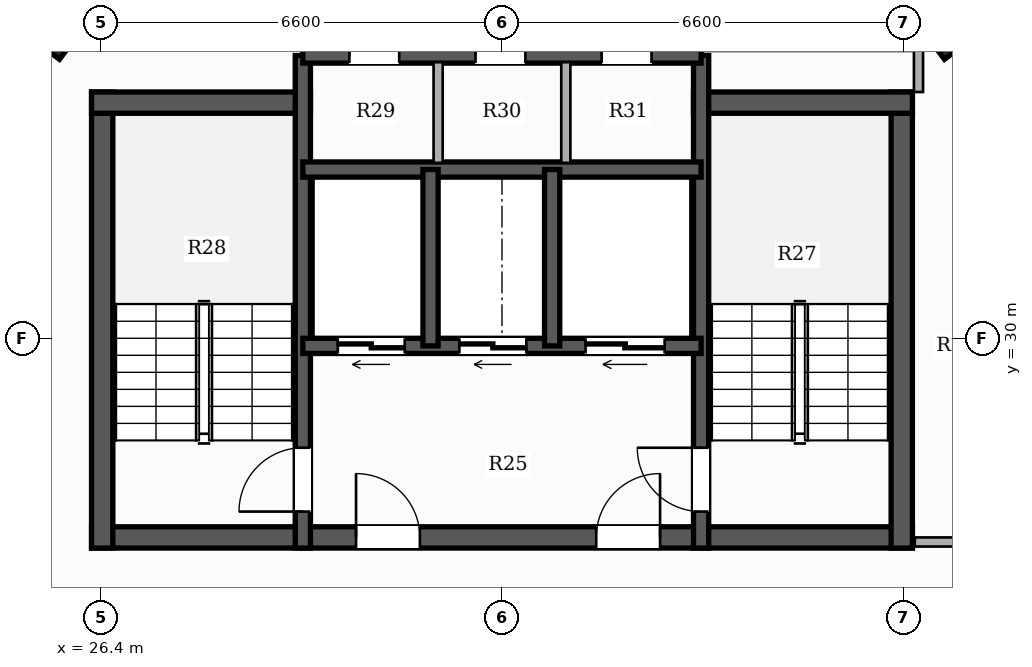
"""IFC4 building model, lengths in metres.
Left out: names, types, materials, properties, quantities, classifications, styles, units other than length and angle.
Written with IfcOpenShell. Run it as: python <this file> out.ifc"""

import sys

from ifc_helpers import new_model, si_unit, direction, frame, frame_2d, origin, origin_2d, place, context, subcontext, project, spatial, rectangle, hollow_rectangle, extrude, element, fill, save


model = new_model("IFC4")
c1 = context("Model", 3, precision=1e-05, world=origin(), true_north=direction((0.0, 1.0)))
c2 = subcontext(c1, "Body", "Model", "MODEL_VIEW")
j1 = project(units=[si_unit("LENGTHUNIT", "METRE"), si_unit("PLANEANGLEUNIT", "RADIAN")], contexts=[c1])
p1 = place(None, origin())
s1 = spatial("IfcSite", under=j1, at=p1, CompositionType="ELEMENT")
p2 = place(p1, origin())
s2 = spatial("IfcBuilding", under=s1, at=p2, CompositionType="ELEMENT")
p3 = place(p2, frame((0.0, 0.0, 212.9)))
s3 = spatial("IfcBuildingStorey", under=s2, at=p3, CompositionType="ELEMENT", Elevation=212.9)
p4 = place(p3, frame((26.25, 26.725, 0.0), z_axis=(0.0, 0.0, 1.0), x_axis=(1.0, 0.0, 0.0)))
e1 = element("IfcWall", 1, at=p4, inside=s3, PredefinedType="SHEAR", context=c2, shape_type="SweptSolid", body=[
    extrude(rectangle(XDim=13.5, YDim=0.35, at=frame_2d((6.75, 0.0))), origin(), (0.0, 0.0, 1.0), 3.3),
])
p5 = place(p4, frame((4.35, 0.0, 0.0)))
e2 = element("IfcOpeningElement", 2, at=p5, cuts=e1, PredefinedType="OPENING", context=c2, shape_type="SweptSolid", body=[
    extrude(rectangle(XDim=1.05, YDim=2.15, at=frame_2d((0.525, 1.075))), frame((0.0, 0.185, 0.0), z_axis=(0.0, -1.0, 0.0), x_axis=(1.0, 0.0, 0.0)), (0.0, 0.0, 1.0), 0.37),
])
p6 = place(p4, frame((8.3, 0.0, 0.0)))
e3 = element("IfcOpeningElement", 3, at=p6, cuts=e1, PredefinedType="OPENING", context=c2, shape_type="SweptSolid", body=[
    extrude(rectangle(XDim=1.05, YDim=2.15, at=frame_2d((0.525, 1.075))), frame((0.0, 0.185, 0.0), z_axis=(0.0, -1.0, 0.0), x_axis=(1.0, 0.0, 0.0)), (0.0, 0.0, 1.0), 0.37),
])
p7 = place(p3, frame((26.425, 26.55, 0.0), z_axis=(0.0, 0.0, 1.0), x_axis=(0.0, 1.0, 0.0)))
e4 = element("IfcWall", 4, at=p7, inside=s3, PredefinedType="SHEAR", context=c2, shape_type="SweptSolid", body=[
    extrude(rectangle(XDim=7.5, YDim=0.35, at=frame_2d((3.75, 0.0))), origin(), (0.0, 0.0, 1.0), 3.3),
])
p8 = place(p3, frame((26.25, 33.875, 0.0), z_axis=(0.0, 0.0, 1.0), x_axis=(1.0, 0.0, 0.0)))
e5 = element("IfcWall", 5, at=p8, inside=s3, PredefinedType="SHEAR", context=c2, shape_type="SweptSolid", body=[
    extrude(rectangle(XDim=3.6, YDim=0.35, at=frame_2d((1.8, 0.0))), origin(), (0.0, 0.0, 1.0), 3.3),
])
p9 = place(p3, frame((39.575, 26.55, 0.0), z_axis=(0.0, 0.0, 1.0), x_axis=(0.0, 1.0, 0.0)))
e6 = element("IfcWall", 6, at=p9, inside=s3, PredefinedType="SHEAR", context=c2, shape_type="SweptSolid", body=[
    extrude(rectangle(XDim=7.5, YDim=0.35, at=frame_2d((3.75, 0.0))), origin(), (0.0, 0.0, 1.0), 3.3),
])
p10 = place(p3, frame((36.15, 33.875, 0.0), z_axis=(0.0, 0.0, 1.0), x_axis=(1.0, 0.0, 0.0)))
e7 = element("IfcWall", 7, at=p10, inside=s3, PredefinedType="SHEAR", context=c2, shape_type="SweptSolid", body=[
    extrude(rectangle(XDim=3.6, YDim=0.35, at=frame_2d((1.8, 0.0))), origin(), (0.0, 0.0, 1.0), 3.3),
])
p11 = place(p3, frame((29.725, 26.55, 0.0), z_axis=(0.0, 0.0, 1.0), x_axis=(0.0, 1.0, 0.0)))
e8 = element("IfcWall", 8, at=p11, inside=s3, PredefinedType="SHEAR", context=c2, shape_type="SweptSolid", body=[
    extrude(rectangle(XDim=8.1, YDim=0.25, at=frame_2d((4.05, 0.0))), origin(), (0.0, 0.0, 1.0), 3.3),
])
p12 = place(p11, frame((0.6, 0.0, 0.0)))
e9 = element("IfcOpeningElement", 9, at=p12, cuts=e8, PredefinedType="OPENING", context=c2, shape_type="SweptSolid", body=[
    extrude(rectangle(XDim=1.05, YDim=2.15, at=frame_2d((0.525, 1.075))), frame((0.0, 0.135, 0.0), z_axis=(0.0, -1.0, 0.0), x_axis=(1.0, 0.0, 0.0)), (0.0, 0.0, 1.0), 0.27),
])
p13 = place(p3, frame((36.275, 26.55, 0.0), z_axis=(0.0, 0.0, 1.0), x_axis=(0.0, 1.0, 0.0)))
e10 = element("IfcWall", 10, at=p13, inside=s3, PredefinedType="SHEAR", context=c2, shape_type="SweptSolid", body=[
    extrude(rectangle(XDim=8.1, YDim=0.25, at=frame_2d((4.05, 0.0))), origin(), (0.0, 0.0, 1.0), 3.3),
])
p14 = place(p13, frame((0.6, 0.0, 0.0)))
e11 = element("IfcOpeningElement", 11, at=p14, cuts=e10, PredefinedType="OPENING", context=c2, shape_type="SweptSolid", body=[
    extrude(rectangle(XDim=1.05, YDim=2.15, at=frame_2d((0.525, 1.075))), frame((0.0, 0.135, 0.0), z_axis=(0.0, -1.0, 0.0), x_axis=(1.0, 0.0, 0.0)), (0.0, 0.0, 1.0), 0.27),
])
p15 = place(p3, frame((36.275, 29.875, 0.0), z_axis=(0.0, 0.0, 1.0), x_axis=(-1.0, 0.0, 0.0)))
e12 = element("IfcWall", 12, at=p15, inside=s3, PredefinedType="SHEAR", context=c2, shape_type="SweptSolid", body=[
    extrude(rectangle(XDim=6.55, YDim=0.25, at=frame_2d((3.275, 0.0))), origin(), (0.0, 0.0, 1.0), 3.3),
])
p16 = place(p15, frame((4.875, 0.0, 0.0)))
e13 = element("IfcOpeningElement", 13, at=p16, cuts=e12, PredefinedType="OPENING", context=c2, shape_type="SweptSolid", body=[
    extrude(rectangle(XDim=1.1, YDim=2.2, at=frame_2d((0.55, 1.1))), frame((0.0, 0.135, 0.0), z_axis=(0.0, -1.0, 0.0), x_axis=(1.0, 0.0, 0.0)), (0.0, 0.0, 1.0), 0.27),
])
p17 = place(p15, frame((2.875, 0.0, 0.0)))
e14 = element("IfcOpeningElement", 14, at=p17, cuts=e12, PredefinedType="OPENING", context=c2, shape_type="SweptSolid", body=[
    extrude(rectangle(XDim=1.1, YDim=2.2, at=frame_2d((0.55, 1.1))), frame((0.0, 0.135, 0.0), z_axis=(0.0, -1.0, 0.0), x_axis=(1.0, 0.0, 0.0)), (0.0, 0.0, 1.0), 0.27),
])
p18 = place(p15, frame((0.6, 0.0, 0.0)))
e15 = element("IfcOpeningElement", 15, at=p18, cuts=e12, PredefinedType="OPENING", context=c2, shape_type="SweptSolid", body=[
    extrude(rectangle(XDim=1.3, YDim=2.2, at=frame_2d((0.65, 1.1))), frame((0.0, 0.135, 0.0), z_axis=(0.0, -1.0, 0.0), x_axis=(1.0, 0.0, 0.0)), (0.0, 0.0, 1.0), 0.27),
])
p19 = place(p3, frame((29.725, 32.775, 0.0), z_axis=(0.0, 0.0, 1.0), x_axis=(1.0, 0.0, 0.0)))
e16 = element("IfcWall", 16, at=p19, inside=s3, PredefinedType="SHEAR", context=c2, shape_type="SweptSolid", body=[
    extrude(rectangle(XDim=6.55, YDim=0.25, at=frame_2d((3.275, 0.0))), origin(), (0.0, 0.0, 1.0), 3.3),
])
for number, where, z_axis, x_axis in (
    (17, (31.825, 29.875, 0.0), (0.0, 0.0, 1.0), (0.0, 1.0, 0.0)),
    (18, (33.825, 29.875, 0.0), (0.0, 0.0, 1.0), (0.0, 1.0, 0.0)),
):
    element("IfcWall", number, at=place(p3, frame(where, z_axis=z_axis, x_axis=x_axis)), inside=s3, PredefinedType="SHEAR", context=c2, shape_type="SweptSolid", body=[
        extrude(rectangle(XDim=2.9, YDim=0.25, at=frame_2d((1.45, 0.0))), origin(), (0.0, 0.0, 1.0), 3.3),
    ])
p20 = place(p3, frame((29.725, 34.65, 0.0), z_axis=(0.0, 0.0, 1.0), x_axis=(1.0, 0.0, 0.0)))
e19 = element("IfcWall", 19, at=p20, inside=s3, PredefinedType="SHEAR", context=c2, shape_type="SweptSolid", body=[
    extrude(rectangle(XDim=6.55, YDim=0.25, at=frame_2d((3.275, 0.0))), origin(), (0.0, 0.0, 1.0), 3.3),
])
p21 = place(p20, frame((0.765, 0.0, 0.0)))
e20 = element("IfcOpeningElement", 20, at=p21, cuts=e19, PredefinedType="OPENING", context=c2, shape_type="SweptSolid", body=[
    extrude(rectangle(XDim=0.82, YDim=2.1, at=frame_2d((0.41, 1.05))), frame((0.0, 0.135, 0.0), z_axis=(0.0, -1.0, 0.0), x_axis=(1.0, 0.0, 0.0)), (0.0, 0.0, 1.0), 0.27),
])
p22 = place(p20, frame((2.84, 0.0, 0.0)))
e21 = element("IfcOpeningElement", 21, at=p22, cuts=e19, PredefinedType="OPENING", context=c2, shape_type="SweptSolid", body=[
    extrude(rectangle(XDim=0.82, YDim=2.1, at=frame_2d((0.41, 1.05))), frame((0.0, 0.135, 0.0), z_axis=(0.0, -1.0, 0.0), x_axis=(1.0, 0.0, 0.0)), (0.0, 0.0, 1.0), 0.27),
])
p23 = place(p20, frame((4.915, 0.0, 0.0)))
e22 = element("IfcOpeningElement", 22, at=p23, cuts=e19, PredefinedType="OPENING", context=c2, shape_type="SweptSolid", body=[
    extrude(rectangle(XDim=0.82, YDim=2.1, at=frame_2d((0.41, 1.05))), frame((0.0, 0.135, 0.0), z_axis=(0.0, -1.0, 0.0), x_axis=(1.0, 0.0, 0.0)), (0.0, 0.0, 1.0), 0.27),
])
for number, where, z_axis, x_axis in (
    (23, (25.648, 35.113, 0.0), (0.0, 0.0, 1.0), (0.6, 0.8, 0.0)),
    (24, (40.352, 35.113, 0.0), (0.0, 0.0, 1.0), (-0.6, 0.8, 0.0)),
):
    element("IfcColumn", number, at=place(p3, frame(where, z_axis=z_axis, x_axis=x_axis)), inside=s3, PredefinedType="COLUMN", context=c2, shape_type="SweptSolid", body=[
        extrude(hollow_rectangle(XDim=0.75, YDim=0.75, WallThickness=0.025, at=origin_2d()), origin(), (0.0, 0.0, 1.0), 3.3),
    ])
for number, where, z_axis, x_axis in (
    (25, (31.95, 32.885, 0.0), (0.0, 0.0, 1.0), (0.0, 1.0, 0.0)),
    (26, (34.05, 32.885, 0.0), (0.0, 0.0, 1.0), (0.0, 1.0, 0.0)),
):
    element("IfcWall", number, at=place(p3, frame(where, z_axis=z_axis, x_axis=x_axis)), inside=s3, PredefinedType="PARTITIONING", context=c2, shape_type="SweptSolid", body=[
        extrude(rectangle(XDim=1.655, YDim=0.15, at=frame_2d((0.828, 0.0))), origin(), (0.0, 0.0, 1.0), 3.06),
    ])
p24 = place(p3, frame((39.79, 26.65, 0.0), z_axis=(0.0, 0.0, 1.0), x_axis=(1.0, 0.0, 0.0)))
e27 = element("IfcWall", 27, at=p24, inside=s3, PredefinedType="PARTITIONING", context=c2, shape_type="SweptSolid", body=[
    extrude(rectangle(XDim=2.46, YDim=0.15, at=frame_2d((1.23, 0.0))), origin(), (0.0, 0.0, 1.0), 2.565),
])
p25 = place(p24, frame((0.79, 0.0, 0.0)))
e28 = element("IfcOpeningElement", 28, at=p25, cuts=e27, PredefinedType="OPENING", context=c2, shape_type="SweptSolid", body=[
    extrude(rectangle(XDim=0.88, YDim=2.1, at=frame_2d((0.44, 1.05))), frame((0.0, 0.085, 0.0), z_axis=(0.0, -1.0, 0.0), x_axis=(1.0, 0.0, 0.0)), (0.0, 0.0, 1.0), 0.17),
])
p26 = place(p3, frame((39.85, 34.74, 0.0), z_axis=(0.0, 0.0, 1.0), x_axis=(0.0, -1.0, 0.0)))
e29 = element("IfcWall", 29, at=p26, inside=s3, PredefinedType="PARTITIONING", context=c2, shape_type="SweptSolid", body=[
    extrude(rectangle(XDim=0.69, YDim=0.15, at=frame_2d((0.345, 0.0))), origin(), (0.0, 0.0, 1.0), 2.773),
])
p27 = place(p12, origin())
e30 = element("IfcDoor", 30, at=p27, inside=s3, OperationType="SINGLE_SWING_LEFT", PredefinedType="DOOR", context=c2, shape_type="SweptSolid", body=[
    extrude(rectangle(XDim=1.05, YDim=2.15, at=frame_2d((0.525, 1.075))), frame((0.0, 0.025, 0.0), z_axis=(0.0, -1.0, 0.0), x_axis=(1.0, 0.0, 0.0)), (0.0, 0.0, 1.0), 0.05),
])
fill(e9, e30)
p28 = place(p14, origin())
e31 = element("IfcDoor", 31, at=p28, inside=s3, OperationType="SINGLE_SWING_RIGHT", PredefinedType="DOOR", context=c2, shape_type="SweptSolid", body=[
    extrude(rectangle(XDim=1.05, YDim=2.15, at=frame_2d((0.525, 1.075))), frame((0.0, 0.025, 0.0), z_axis=(0.0, -1.0, 0.0), x_axis=(1.0, 0.0, 0.0)), (0.0, 0.0, 1.0), 0.05),
])
fill(e11, e31)
p29 = place(p5, origin())
e32 = element("IfcDoor", 32, at=p29, inside=s3, OperationType="SINGLE_SWING_LEFT", PredefinedType="DOOR", context=c2, shape_type="SweptSolid", body=[
    extrude(rectangle(XDim=1.05, YDim=2.15, at=frame_2d((0.525, 1.075))), frame((0.0, 0.025, 0.0), z_axis=(0.0, -1.0, 0.0), x_axis=(1.0, 0.0, 0.0)), (0.0, 0.0, 1.0), 0.05),
])
fill(e2, e32)
p30 = place(p6, origin())
e33 = element("IfcDoor", 33, at=p30, inside=s3, OperationType="SINGLE_SWING_RIGHT", PredefinedType="DOOR", context=c2, shape_type="SweptSolid", body=[
    extrude(rectangle(XDim=1.05, YDim=2.15, at=frame_2d((0.525, 1.075))), frame((0.0, 0.025, 0.0), z_axis=(0.0, -1.0, 0.0), x_axis=(1.0, 0.0, 0.0)), (0.0, 0.0, 1.0), 0.05),
])
fill(e3, e33)
p31 = place(p16, origin())
e34 = element("IfcDoor", 34, at=p31, inside=s3, OperationType="DOUBLE_DOOR_SLIDING", PredefinedType="DOOR", context=c2, shape_type="SweptSolid", body=[
    extrude(rectangle(XDim=1.1, YDim=2.2, at=frame_2d((0.55, 1.1))), frame((0.0, 0.025, 0.0), z_axis=(0.0, -1.0, 0.0), x_axis=(1.0, 0.0, 0.0)), (0.0, 0.0, 1.0), 0.05),
])
fill(e13, e34)
p32 = place(p17, origin())
e35 = element("IfcDoor", 35, at=p32, inside=s3, OperationType="DOUBLE_DOOR_SLIDING", PredefinedType="DOOR", context=c2, shape_type="SweptSolid", body=[
    extrude(rectangle(XDim=1.1, YDim=2.2, at=frame_2d((0.55, 1.1))), frame((0.0, 0.025, 0.0), z_axis=(0.0, -1.0, 0.0), x_axis=(1.0, 0.0, 0.0)), (0.0, 0.0, 1.0), 0.05),
])
fill(e14, e35)
p33 = place(p18, origin())
e36 = element("IfcDoor", 36, at=p33, inside=s3, OperationType="DOUBLE_DOOR_SLIDING", PredefinedType="DOOR", context=c2, shape_type="SweptSolid", body=[
    extrude(rectangle(XDim=1.3, YDim=2.2, at=frame_2d((0.65, 1.1))), frame((0.0, 0.025, 0.0), z_axis=(0.0, -1.0, 0.0), x_axis=(1.0, 0.0, 0.0)), (0.0, 0.0, 1.0), 0.05),
])
fill(e15, e36)
p34 = place(p21, origin())
e37 = element("IfcDoor", 37, at=p34, inside=s3, OperationType="SINGLE_SWING_LEFT", PredefinedType="DOOR", context=c2, shape_type="SweptSolid", body=[
    extrude(rectangle(XDim=0.82, YDim=2.1, at=frame_2d((0.41, 1.05))), frame((0.0, 0.025, 0.0), z_axis=(0.0, -1.0, 0.0), x_axis=(1.0, 0.0, 0.0)), (0.0, 0.0, 1.0), 0.05),
])
fill(e20, e37)
p35 = place(p22, origin())
e38 = element("IfcDoor", 38, at=p35, inside=s3, OperationType="SINGLE_SWING_LEFT", PredefinedType="DOOR", context=c2, shape_type="SweptSolid", body=[
    extrude(rectangle(XDim=0.82, YDim=2.1, at=frame_2d((0.41, 1.05))), frame((0.0, 0.025, 0.0), z_axis=(0.0, -1.0, 0.0), x_axis=(1.0, 0.0, 0.0)), (0.0, 0.0, 1.0), 0.05),
])
fill(e21, e38)
p36 = place(p23, origin())
e39 = element("IfcDoor", 39, at=p36, inside=s3, OperationType="SINGLE_SWING_LEFT", PredefinedType="DOOR", context=c2, shape_type="SweptSolid", body=[
    extrude(rectangle(XDim=0.82, YDim=2.1, at=frame_2d((0.41, 1.05))), frame((0.0, 0.025, 0.0), z_axis=(0.0, -1.0, 0.0), x_axis=(1.0, 0.0, 0.0)), (0.0, 0.0, 1.0), 0.05),
])
fill(e22, e39)
save(model, sys.argv[1])
